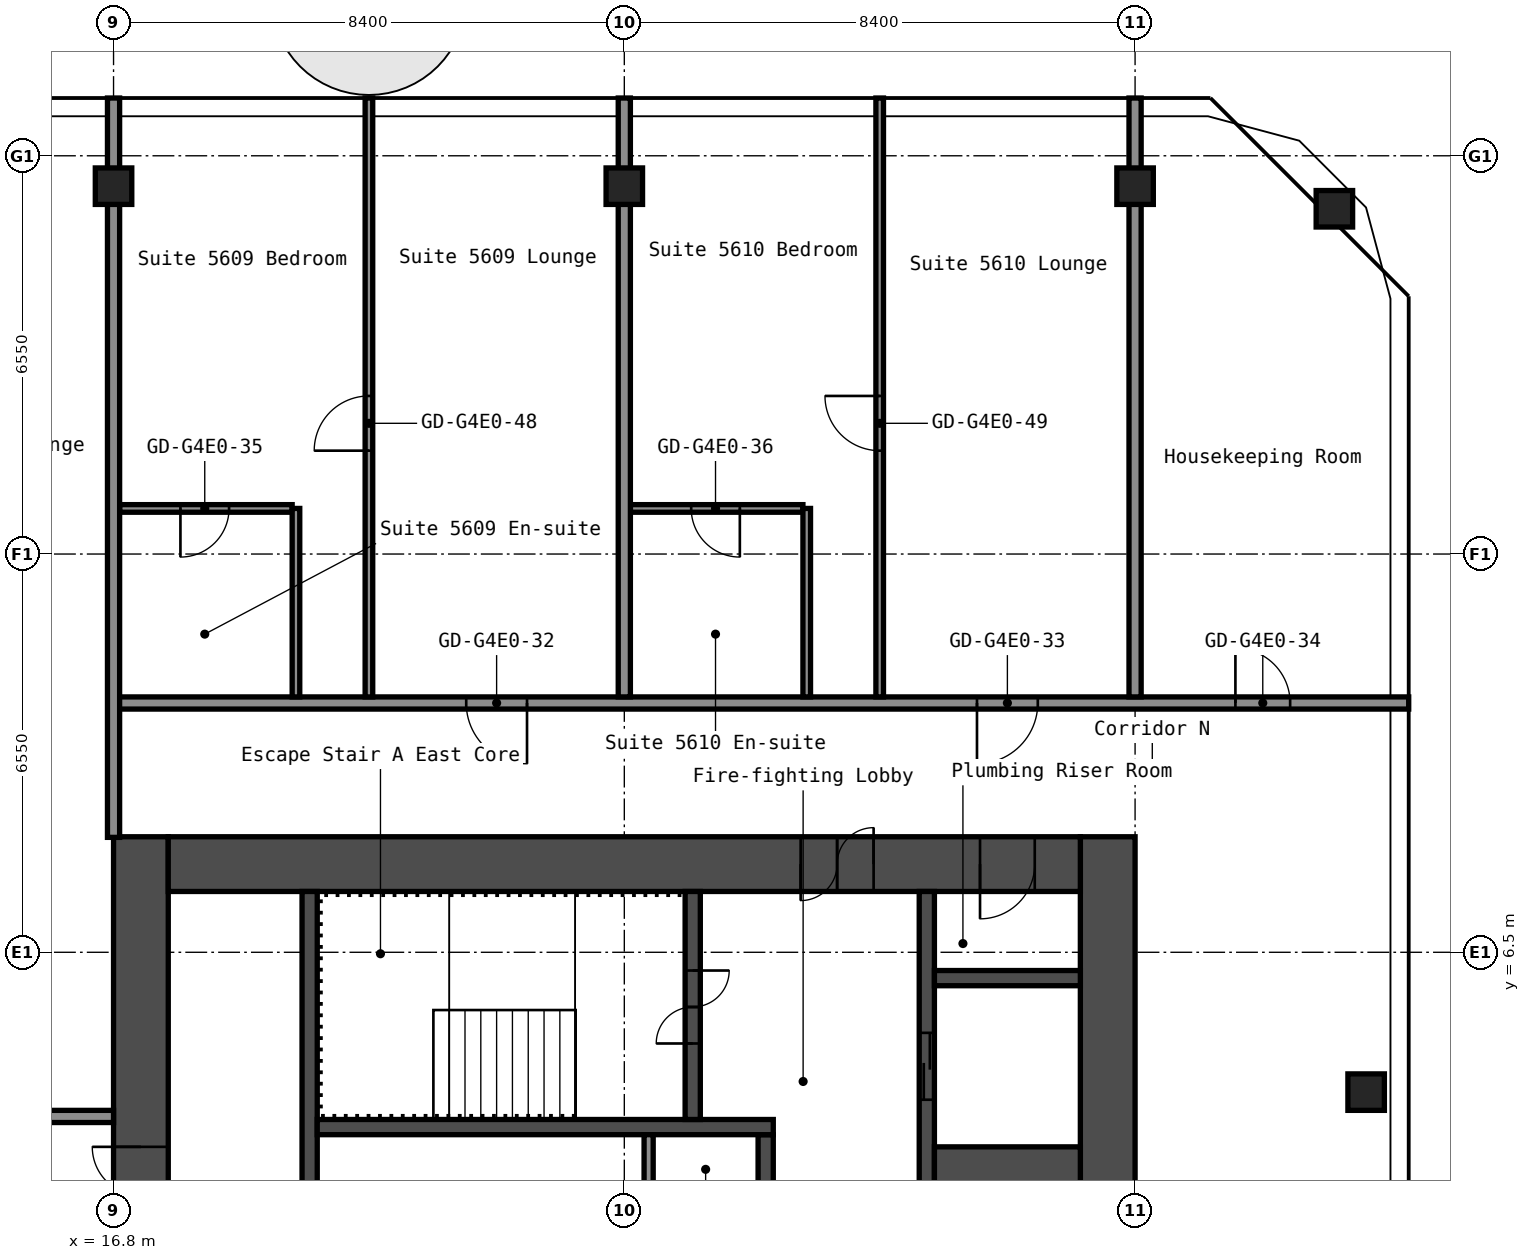
"""IFC4 building model, lengths in metres.
Left out: names, types, materials, properties, quantities, classifications, styles, units other than length and angle.
Written with IfcOpenShell. Run it as: python <this file> out.ifc"""

import sys

from ifc_helpers import new_model, si_unit, direction, frame, frame_2d, origin, origin_2d, place, context, subcontext, project, spatial, rectangle, hollow_rectangle, extrude, element, fill, save


model = new_model("IFC4")
c1 = context("Model", 3, precision=1e-05, world=origin(), true_north=direction((0.0, 1.0)))
c2 = subcontext(c1, "Body", "Model", "MODEL_VIEW")
j1 = project(units=[si_unit("LENGTHUNIT", "METRE"), si_unit("PLANEANGLEUNIT", "RADIAN")], contexts=[c1])
p1 = place(None, origin())
s1 = spatial("IfcSite", under=j1, at=p1, CompositionType="ELEMENT")
p2 = place(p1, origin())
s2 = spatial("IfcBuilding", under=s1, at=p2, CompositionType="ELEMENT")
p3 = place(p2, frame((0.0, 0.0, 199.4)))
s3 = spatial("IfcBuildingStorey", under=s2, at=p3, CompositionType="ELEMENT", Elevation=199.4)
for number, where, z_axis, x_axis in (
    (1, (16.8, 19.1, 0.0), (0.0, 0.0, 1.0), (1.0, 0.0, 0.0)),
    (2, (25.2, 19.1, 0.0), (0.0, 0.0, 1.0), (1.0, 0.0, 0.0)),
    (3, (33.6, 19.1, 0.0), (0.0, 0.0, 1.0), (1.0, 0.0, 0.0)),
    (4, (37.4, 4.2, 0.0), (0.0, 0.0, 1.0), (1.0, 0.0, 0.0)),
    (5, (36.878, 18.729, 0.0), (0.0, 0.0, 1.0), (1.0, 0.0, 0.0)),
):
    element("IfcColumn", number, at=place(p3, frame(where, z_axis=z_axis, x_axis=x_axis)), inside=s3, PredefinedType="COLUMN", context=c2, shape_type="SweptSolid", body=[
        extrude(hollow_rectangle(XDim=0.6, YDim=0.6, WallThickness=0.025, InnerFilletRadius=0.038, OuterFilletRadius=0.062, at=origin_2d()), origin(), (0.0, 0.0, 1.0), 2.75),
    ])
p4 = place(p3, frame((17.25, -8.4, 0.0), z_axis=(0.0, 0.0, 1.0), x_axis=(0.0, 1.0, 0.0)))
e6 = element("IfcWall", 6, at=p4, inside=s3, PredefinedType="SHEAR", context=c2, shape_type="SweptSolid", body=[
    extrude(rectangle(XDim=16.8, YDim=0.9, at=frame_2d((8.4, 0.0))), origin(), (0.0, 0.0, 1.0), 2.75),
])
p5 = place(p4, frame((10.1, 0.0, 0.0)))
e7 = element("IfcOpeningElement", 7, at=p5, cuts=e6, PredefinedType="OPENING", context=c2, shape_type="SweptSolid", body=[
    extrude(rectangle(XDim=1.6, YDim=2.1, at=frame_2d((0.8, 1.05))), frame((0.0, 0.46, 0.0), z_axis=(0.0, -1.0, 0.0), x_axis=(1.0, 0.0, 0.0)), (0.0, 0.0, 1.0), 0.92),
])
p6 = place(p3, frame((33.15, -8.4, 0.0), z_axis=(0.0, 0.0, 1.0), x_axis=(0.0, 1.0, 0.0)))
e8 = element("IfcWall", 8, at=p6, inside=s3, PredefinedType="SHEAR", context=c2, shape_type="SweptSolid", body=[
    extrude(rectangle(XDim=16.8, YDim=0.9, at=frame_2d((8.4, 0.0))), origin(), (0.0, 0.0, 1.0), 2.75),
])
p7 = place(p3, frame((17.7, 7.95, 0.0), z_axis=(0.0, 0.0, 1.0), x_axis=(1.0, 0.0, 0.0)))
e9 = element("IfcWall", 9, at=p7, inside=s3, PredefinedType="SHEAR", context=c2, shape_type="SweptSolid", body=[
    extrude(rectangle(XDim=15.0, YDim=0.9, at=frame_2d((7.5, 0.0))), origin(), (0.0, 0.0, 1.0), 2.75),
])
p8 = place(p7, frame((10.4, 0.0, 0.0)))
e10 = element("IfcOpeningElement", 10, at=p8, cuts=e9, PredefinedType="OPENING", context=c2, shape_type="SweptSolid", body=[
    extrude(rectangle(XDim=1.2, YDim=2.1, at=frame_2d((0.6, 1.05))), frame((0.0, 0.46, 0.0), z_axis=(0.0, -1.0, 0.0), x_axis=(1.0, 0.0, 0.0)), (0.0, 0.0, 1.0), 0.92),
])
p9 = place(p7, frame((13.35, 0.0, 0.0)))
e11 = element("IfcOpeningElement", 11, at=p9, cuts=e9, PredefinedType="OPENING", context=c2, shape_type="SweptSolid", body=[
    extrude(rectangle(XDim=0.9, YDim=2.1, at=frame_2d((0.45, 1.05))), frame((0.0, 0.46, 0.0), z_axis=(0.0, -1.0, 0.0), x_axis=(1.0, 0.0, 0.0)), (0.0, 0.0, 1.0), 0.92),
])
p10 = place(p3, frame((20.025, 1.2, 0.0), z_axis=(0.0, 0.0, 1.0), x_axis=(0.0, 1.0, 0.0)))
e12 = element("IfcWall", 12, at=p10, inside=s3, PredefinedType="SHEAR", context=c2, shape_type="SweptSolid", body=[
    extrude(rectangle(XDim=6.3, YDim=0.25, at=frame_2d((3.15, 0.0))), origin(), (0.0, 0.0, 1.0), 2.75),
])
p11 = place(p3, frame((27.525, 1.45, 0.0), z_axis=(0.0, 0.0, 1.0), x_axis=(0.0, 1.0, 0.0)))
e13 = element("IfcWall", 13, at=p11, inside=s3, PredefinedType="SHEAR", context=c2, shape_type="SweptSolid", body=[
    extrude(rectangle(XDim=2.05, YDim=0.25, at=frame_2d((1.025, 0.0))), origin(), (0.0, 0.0, 1.0), 2.75),
])
p12 = place(p3, frame((20.15, 3.625, 0.0), z_axis=(0.0, 0.0, 1.0), x_axis=(1.0, 0.0, 0.0)))
e14 = element("IfcWall", 14, at=p12, inside=s3, PredefinedType="SHEAR", context=c2, shape_type="SweptSolid", body=[
    extrude(rectangle(XDim=7.5, YDim=0.25, at=frame_2d((3.75, 0.0))), origin(), (0.0, 0.0, 1.0), 2.75),
])
p13 = place(p3, frame((26.325, 3.75, 0.0), z_axis=(0.0, 0.0, 1.0), x_axis=(0.0, 1.0, 0.0)))
e15 = element("IfcWall", 15, at=p13, inside=s3, PredefinedType="SHEAR", context=c2, shape_type="SweptSolid", body=[
    extrude(rectangle(XDim=3.75, YDim=0.25, at=frame_2d((1.875, 0.0))), origin(), (0.0, 0.0, 1.0), 2.75),
])
p14 = place(p13, frame((1.25, 0.0, 0.0)))
e16 = element("IfcOpeningElement", 16, at=p14, cuts=e15, PredefinedType="OPENING", context=c2, shape_type="SweptSolid", body=[
    extrude(rectangle(XDim=1.2, YDim=2.1, at=frame_2d((0.6, 1.05))), frame((0.0, 0.135, 0.0), z_axis=(0.0, -1.0, 0.0), x_axis=(1.0, 0.0, 0.0)), (0.0, 0.0, 1.0), 0.27),
])
p15 = place(p3, frame((30.175, 1.45, 0.0), z_axis=(0.0, 0.0, 1.0), x_axis=(0.0, 1.0, 0.0)))
e17 = element("IfcWall", 17, at=p15, inside=s3, PredefinedType="SHEAR", context=c2, shape_type="SweptSolid", body=[
    extrude(rectangle(XDim=6.05, YDim=0.25, at=frame_2d((3.025, 0.0))), origin(), (0.0, 0.0, 1.0), 2.75),
])
p16 = place(p15, frame((2.625, 0.0, 0.0)))
e18 = element("IfcOpeningElement", 18, at=p16, cuts=e17, PredefinedType="OPENING", context=c2, shape_type="SweptSolid", body=[
    extrude(rectangle(XDim=1.1, YDim=2.1, at=frame_2d((0.55, 1.05))), frame((0.0, 0.135, 0.0), z_axis=(0.0, -1.0, 0.0), x_axis=(1.0, 0.0, 0.0)), (0.0, 0.0, 1.0), 0.27),
])
p17 = place(p3, frame((30.3, 2.375, 0.0), z_axis=(0.0, 0.0, 1.0), x_axis=(1.0, 0.0, 0.0)))
e19 = element("IfcWall", 19, at=p17, inside=s3, PredefinedType="SHEAR", context=c2, shape_type="SweptSolid", body=[
    extrude(rectangle(XDim=2.4, YDim=1.85, at=frame_2d((1.2, 0.0))), origin(), (0.0, 0.0, 1.0), 2.75),
])
p18 = place(p3, frame((30.3, 6.075, 0.0), z_axis=(0.0, 0.0, 1.0), x_axis=(1.0, 0.0, 0.0)))
e20 = element("IfcWall", 20, at=p18, inside=s3, PredefinedType="SHEAR", context=c2, shape_type="SweptSolid", body=[
    extrude(rectangle(XDim=2.4, YDim=0.25, at=frame_2d((1.2, 0.0))), origin(), (0.0, 0.0, 1.0), 2.75),
])
p19 = place(p3, frame((25.6, 1.45, 0.0), z_axis=(0.0, 0.0, 1.0), x_axis=(0.0, 1.0, 0.0)))
e21 = element("IfcWall", 21, at=p19, inside=s3, PredefinedType="PARTITIONING", context=c2, shape_type="SweptSolid", body=[
    extrude(rectangle(XDim=2.05, YDim=0.15, at=frame_2d((1.025, 0.0))), origin(), (0.0, 0.0, 1.0), 2.75),
])
p20 = place(p3, frame((-16.8, 3.8, 0.0), z_axis=(0.0, 0.0, 1.0), x_axis=(1.0, 0.0, 0.0)))
e22 = element("IfcWall", 22, at=p20, inside=s3, PredefinedType="PARTITIONING", context=c2, shape_type="SweptSolid", body=[
    extrude(rectangle(XDim=33.6, YDim=0.2, at=frame_2d((16.8, 0.0))), origin(), (0.0, 0.0, 1.0), 2.75),
])
p21 = place(p20, frame((5.8, 0.0, 0.0)))
e23 = element("IfcOpeningElement", 23, at=p21, cuts=e22, PredefinedType="OPENING", context=c2, shape_type="SweptSolid", body=[
    extrude(rectangle(XDim=1.0, YDim=2.1, at=frame_2d((0.5, 1.05))), frame((0.0, 0.11, 0.0), z_axis=(0.0, -1.0, 0.0), x_axis=(1.0, 0.0, 0.0)), (0.0, 0.0, 1.0), 0.22),
])
p22 = place(p20, frame((10.3, 0.0, 0.0)))
e24 = element("IfcOpeningElement", 24, at=p22, cuts=e22, PredefinedType="OPENING", context=c2, shape_type="SweptSolid", body=[
    extrude(rectangle(XDim=1.0, YDim=2.1, at=frame_2d((0.5, 1.05))), frame((0.0, 0.11, 0.0), z_axis=(0.0, -1.0, 0.0), x_axis=(1.0, 0.0, 0.0)), (0.0, 0.0, 1.0), 0.22),
])
p23 = place(p20, frame((22.6, 0.0, 0.0)))
e25 = element("IfcOpeningElement", 25, at=p23, cuts=e22, PredefinedType="OPENING", context=c2, shape_type="SweptSolid", body=[
    extrude(rectangle(XDim=1.0, YDim=2.1, at=frame_2d((0.5, 1.05))), frame((0.0, 0.11, 0.0), z_axis=(0.0, -1.0, 0.0), x_axis=(1.0, 0.0, 0.0)), (0.0, 0.0, 1.0), 0.22),
])
p24 = place(p20, frame((31.0, 0.0, 0.0)))
e26 = element("IfcOpeningElement", 26, at=p24, cuts=e22, PredefinedType="OPENING", context=c2, shape_type="SweptSolid", body=[
    extrude(rectangle(XDim=1.0, YDim=2.1, at=frame_2d((0.5, 1.05))), frame((0.0, 0.11, 0.0), z_axis=(0.0, -1.0, 0.0), x_axis=(1.0, 0.0, 0.0)), (0.0, 0.0, 1.0), 0.22),
])
p25 = place(p3, frame((16.8, 10.6, 0.0), z_axis=(0.0, 0.0, 1.0), x_axis=(1.0, 0.0, 0.0)))
e27 = element("IfcWall", 27, at=p25, inside=s3, PredefinedType="PARTITIONING", context=c2, shape_type="SweptSolid", body=[
    extrude(rectangle(XDim=21.3, YDim=0.2, at=frame_2d((10.65, 0.0))), origin(), (0.0, 0.0, 1.0), 2.75),
])
p26 = place(p25, frame((5.8, 0.0, 0.0)))
e28 = element("IfcOpeningElement", 28, at=p26, cuts=e27, PredefinedType="OPENING", context=c2, shape_type="SweptSolid", body=[
    extrude(rectangle(XDim=1.0, YDim=2.1, at=frame_2d((0.5, 1.05))), frame((0.0, 0.11, 0.0), z_axis=(0.0, -1.0, 0.0), x_axis=(1.0, 0.0, 0.0)), (0.0, 0.0, 1.0), 0.22),
])
p27 = place(p25, frame((14.2, 0.0, 0.0)))
e29 = element("IfcOpeningElement", 29, at=p27, cuts=e27, PredefinedType="OPENING", context=c2, shape_type="SweptSolid", body=[
    extrude(rectangle(XDim=1.0, YDim=2.1, at=frame_2d((0.5, 1.05))), frame((0.0, 0.11, 0.0), z_axis=(0.0, -1.0, 0.0), x_axis=(1.0, 0.0, 0.0)), (0.0, 0.0, 1.0), 0.22),
])
p28 = place(p25, frame((18.45, 0.0, 0.0)))
e30 = element("IfcOpeningElement", 30, at=p28, cuts=e27, PredefinedType="OPENING", context=c2, shape_type="SweptSolid", body=[
    extrude(rectangle(XDim=0.9, YDim=2.1, at=frame_2d((0.45, 1.05))), frame((0.0, 0.11, 0.0), z_axis=(0.0, -1.0, 0.0), x_axis=(1.0, 0.0, 0.0)), (0.0, 0.0, 1.0), 0.22),
])
p29 = place(p3, frame((16.9, 13.8, 0.0), z_axis=(0.0, 0.0, 1.0), x_axis=(1.0, 0.0, 0.0)))
e31 = element("IfcWall", 31, at=p29, inside=s3, PredefinedType="PARTITIONING", context=c2, shape_type="SweptSolid", body=[
    extrude(rectangle(XDim=2.838, YDim=0.125, at=frame_2d((1.419, 0.0))), origin(), (0.0, 0.0, 1.0), 2.75),
])
p30 = place(p29, frame((1.0, 0.0, 0.0)))
e32 = element("IfcOpeningElement", 32, at=p30, cuts=e31, PredefinedType="OPENING", context=c2, shape_type="SweptSolid", body=[
    extrude(rectangle(XDim=0.8, YDim=2.1, at=frame_2d((0.4, 1.05))), frame((0.0, 0.073, 0.0), z_axis=(0.0, -1.0, 0.0), x_axis=(1.0, 0.0, 0.0)), (0.0, 0.0, 1.0), 0.145),
])
p31 = place(p3, frame((25.3, 13.8, 0.0), z_axis=(0.0, 0.0, 1.0), x_axis=(1.0, 0.0, 0.0)))
e33 = element("IfcWall", 33, at=p31, inside=s3, PredefinedType="PARTITIONING", context=c2, shape_type="SweptSolid", body=[
    extrude(rectangle(XDim=2.837, YDim=0.125, at=frame_2d((1.419, 0.0))), origin(), (0.0, 0.0, 1.0), 2.75),
])
p32 = place(p31, frame((1.0, 0.0, 0.0)))
e34 = element("IfcOpeningElement", 34, at=p32, cuts=e33, PredefinedType="OPENING", context=c2, shape_type="SweptSolid", body=[
    extrude(rectangle(XDim=0.8, YDim=2.1, at=frame_2d((0.4, 1.05))), frame((0.0, 0.073, 0.0), z_axis=(0.0, -1.0, 0.0), x_axis=(1.0, 0.0, 0.0)), (0.0, 0.0, 1.0), 0.145),
])
p33 = place(p3, frame((16.8, 8.39, 0.0), z_axis=(0.0, 0.0, 1.0), x_axis=(0.0, 1.0, 0.0)))
e35 = element("IfcWall", 35, at=p33, inside=s3, PredefinedType="PARTITIONING", context=c2, shape_type="SweptSolid", body=[
    extrude(rectangle(XDim=12.16, YDim=0.2, at=frame_2d((6.08, 0.0))), origin(), (0.0, 0.0, 1.0), 2.75),
])
p34 = place(p3, frame((19.8, 10.7, 0.0), z_axis=(0.0, 0.0, 1.0), x_axis=(0.0, 1.0, 0.0)))
e36 = element("IfcWall", 36, at=p34, inside=s3, PredefinedType="PARTITIONING", context=c2, shape_type="SweptSolid", body=[
    extrude(rectangle(XDim=3.1, YDim=0.125, at=frame_2d((1.55, 0.0))), origin(), (0.0, 0.0, 1.0), 2.75),
])
p35 = place(p3, frame((21.0, 10.7, 0.0), z_axis=(0.0, 0.0, 1.0), x_axis=(0.0, 1.0, 0.0)))
e37 = element("IfcWall", 37, at=p35, inside=s3, PredefinedType="PARTITIONING", context=c2, shape_type="SweptSolid", body=[
    extrude(rectangle(XDim=9.85, YDim=0.125, at=frame_2d((4.925, 0.0))), origin(), (0.0, 0.0, 1.0), 2.75),
])
p36 = place(p35, frame((4.05, 0.0, 0.0)))
e38 = element("IfcOpeningElement", 38, at=p36, cuts=e37, PredefinedType="OPENING", context=c2, shape_type="SweptSolid", body=[
    extrude(rectangle(XDim=0.9, YDim=2.1, at=frame_2d((0.45, 1.05))), frame((0.0, 0.073, 0.0), z_axis=(0.0, -1.0, 0.0), x_axis=(1.0, 0.0, 0.0)), (0.0, 0.0, 1.0), 0.145),
])
p37 = place(p3, frame((25.2, 10.7, 0.0), z_axis=(0.0, 0.0, 1.0), x_axis=(0.0, 1.0, 0.0)))
e39 = element("IfcWall", 39, at=p37, inside=s3, PredefinedType="PARTITIONING", context=c2, shape_type="SweptSolid", body=[
    extrude(rectangle(XDim=9.85, YDim=0.2, at=frame_2d((4.925, 0.0))), origin(), (0.0, 0.0, 1.0), 2.75),
])
p38 = place(p3, frame((28.2, 10.7, 0.0), z_axis=(0.0, 0.0, 1.0), x_axis=(0.0, 1.0, 0.0)))
e40 = element("IfcWall", 40, at=p38, inside=s3, PredefinedType="PARTITIONING", context=c2, shape_type="SweptSolid", body=[
    extrude(rectangle(XDim=3.1, YDim=0.125, at=frame_2d((1.55, 0.0))), origin(), (0.0, 0.0, 1.0), 2.75),
])
p39 = place(p3, frame((29.4, 10.7, 0.0), z_axis=(0.0, 0.0, 1.0), x_axis=(0.0, 1.0, 0.0)))
e41 = element("IfcWall", 41, at=p39, inside=s3, PredefinedType="PARTITIONING", context=c2, shape_type="SweptSolid", body=[
    extrude(rectangle(XDim=9.85, YDim=0.125, at=frame_2d((4.925, 0.0))), origin(), (0.0, 0.0, 1.0), 2.75),
])
p40 = place(p39, frame((4.05, 0.0, 0.0)))
e42 = element("IfcOpeningElement", 42, at=p40, cuts=e41, PredefinedType="OPENING", context=c2, shape_type="SweptSolid", body=[
    extrude(rectangle(XDim=0.9, YDim=2.1, at=frame_2d((0.45, 1.05))), frame((0.0, 0.073, 0.0), z_axis=(0.0, -1.0, 0.0), x_axis=(1.0, 0.0, 0.0)), (0.0, 0.0, 1.0), 0.145),
])
p41 = place(p3, frame((33.6, 10.7, 0.0), z_axis=(0.0, 0.0, 1.0), x_axis=(0.0, 1.0, 0.0)))
e43 = element("IfcWall", 43, at=p41, inside=s3, PredefinedType="PARTITIONING", context=c2, shape_type="SweptSolid", body=[
    extrude(rectangle(XDim=9.85, YDim=0.2, at=frame_2d((4.925, 0.0))), origin(), (0.0, 0.0, 1.0), 2.75),
])
p42 = place(p5, origin())
e44 = element("IfcDoor", 44, at=p42, inside=s3, OperationType="DOUBLE_DOOR_SINGLE_SWING", PredefinedType="DOOR", context=c2, shape_type="SweptSolid", body=[
    extrude(rectangle(XDim=1.6, YDim=2.1, at=frame_2d((0.8, 1.05))), frame((0.0, 0.025, 0.0), z_axis=(0.0, -1.0, 0.0), x_axis=(1.0, 0.0, 0.0)), (0.0, 0.0, 1.0), 0.05),
])
fill(e7, e44)
p43 = place(p8, origin())
e45 = element("IfcDoor", 45, at=p43, inside=s3, OperationType="DOUBLE_DOOR_SINGLE_SWING", PredefinedType="DOOR", context=c2, shape_type="SweptSolid", body=[
    extrude(rectangle(XDim=1.2, YDim=2.1, at=frame_2d((0.6, 1.05))), frame((0.0, 0.025, 0.0), z_axis=(0.0, -1.0, 0.0), x_axis=(1.0, 0.0, 0.0)), (0.0, 0.0, 1.0), 0.05),
])
fill(e10, e45)
p44 = place(p9, origin())
e46 = element("IfcDoor", 46, at=p44, inside=s3, OperationType="SINGLE_SWING_LEFT", PredefinedType="DOOR", context=c2, shape_type="SweptSolid", body=[
    extrude(rectangle(XDim=0.9, YDim=2.1, at=frame_2d((0.45, 1.05))), frame((0.0, 0.025, 0.0), z_axis=(0.0, -1.0, 0.0), x_axis=(1.0, 0.0, 0.0)), (0.0, 0.0, 1.0), 0.05),
])
fill(e11, e46)
p45 = place(p14, origin())
e47 = element("IfcDoor", 47, at=p45, inside=s3, OperationType="DOUBLE_DOOR_SINGLE_SWING", PredefinedType="DOOR", context=c2, shape_type="SweptSolid", body=[
    extrude(rectangle(XDim=1.2, YDim=2.1, at=frame_2d((0.6, 1.05))), frame((0.0, 0.025, 0.0), z_axis=(0.0, -1.0, 0.0), x_axis=(1.0, 0.0, 0.0)), (0.0, 0.0, 1.0), 0.05),
])
fill(e16, e47)
p46 = place(p16, origin())
e48 = element("IfcDoor", 48, at=p46, inside=s3, OperationType="DOUBLE_DOOR_SLIDING", PredefinedType="DOOR", context=c2, shape_type="SweptSolid", body=[
    extrude(rectangle(XDim=1.1, YDim=2.1, at=frame_2d((0.55, 1.05))), frame((0.0, 0.025, 0.0), z_axis=(0.0, -1.0, 0.0), x_axis=(1.0, 0.0, 0.0)), (0.0, 0.0, 1.0), 0.05),
])
fill(e18, e48)
p47 = place(p26, origin())
e49 = element("IfcDoor", 49, at=p47, inside=s3, OperationType="SINGLE_SWING_RIGHT", PredefinedType="DOOR", context=c2, shape_type="SweptSolid", body=[
    extrude(rectangle(XDim=1.0, YDim=2.1, at=frame_2d((0.5, 1.05))), frame((0.0, 0.025, 0.0), z_axis=(0.0, -1.0, 0.0), x_axis=(1.0, 0.0, 0.0)), (0.0, 0.0, 1.0), 0.05),
])
fill(e28, e49)
p48 = place(p27, origin())
e50 = element("IfcDoor", 50, at=p48, inside=s3, OperationType="SINGLE_SWING_LEFT", PredefinedType="DOOR", context=c2, shape_type="SweptSolid", body=[
    extrude(rectangle(XDim=1.0, YDim=2.1, at=frame_2d((0.5, 1.05))), frame((0.0, 0.025, 0.0), z_axis=(0.0, -1.0, 0.0), x_axis=(1.0, 0.0, 0.0)), (0.0, 0.0, 1.0), 0.05),
])
fill(e29, e50)
p49 = place(p28, origin())
e51 = element("IfcDoor", 51, at=p49, inside=s3, OperationType="SINGLE_SWING_RIGHT", PredefinedType="DOOR", context=c2, shape_type="SweptSolid", body=[
    extrude(rectangle(XDim=0.9, YDim=2.1, at=frame_2d((0.45, 1.05))), frame((0.0, 0.025, 0.0), z_axis=(0.0, -1.0, 0.0), x_axis=(1.0, 0.0, 0.0)), (0.0, 0.0, 1.0), 0.05),
])
fill(e30, e51)
p50 = place(p30, origin())
e52 = element("IfcDoor", 52, at=p50, inside=s3, OperationType="SINGLE_SWING_LEFT", PredefinedType="DOOR", context=c2, shape_type="SweptSolid", body=[
    extrude(rectangle(XDim=0.8, YDim=2.1, at=frame_2d((0.4, 1.05))), frame((0.0, 0.025, 0.0), z_axis=(0.0, -1.0, 0.0), x_axis=(1.0, 0.0, 0.0)), (0.0, 0.0, 1.0), 0.05),
])
fill(e32, e52)
p51 = place(p32, origin())
e53 = element("IfcDoor", 53, at=p51, inside=s3, OperationType="SINGLE_SWING_RIGHT", PredefinedType="DOOR", context=c2, shape_type="SweptSolid", body=[
    extrude(rectangle(XDim=0.8, YDim=2.1, at=frame_2d((0.4, 1.05))), frame((0.0, 0.025, 0.0), z_axis=(0.0, -1.0, 0.0), x_axis=(1.0, 0.0, 0.0)), (0.0, 0.0, 1.0), 0.05),
])
fill(e34, e53)
p52 = place(p36, origin())
e54 = element("IfcDoor", 54, at=p52, inside=s3, OperationType="SINGLE_SWING_RIGHT", PredefinedType="DOOR", context=c2, shape_type="SweptSolid", body=[
    extrude(rectangle(XDim=0.9, YDim=2.1, at=frame_2d((0.45, 1.05))), frame((0.0, 0.025, 0.0), z_axis=(0.0, -1.0, 0.0), x_axis=(1.0, 0.0, 0.0)), (0.0, 0.0, 1.0), 0.05),
])
fill(e38, e54)
p53 = place(p40, origin())
e55 = element("IfcDoor", 55, at=p53, inside=s3, OperationType="SINGLE_SWING_LEFT", PredefinedType="DOOR", context=c2, shape_type="SweptSolid", body=[
    extrude(rectangle(XDim=0.9, YDim=2.1, at=frame_2d((0.45, 1.05))), frame((0.0, 0.025, 0.0), z_axis=(0.0, -1.0, 0.0), x_axis=(1.0, 0.0, 0.0)), (0.0, 0.0, 1.0), 0.05),
])
fill(e42, e55)
save(model, sys.argv[1])
